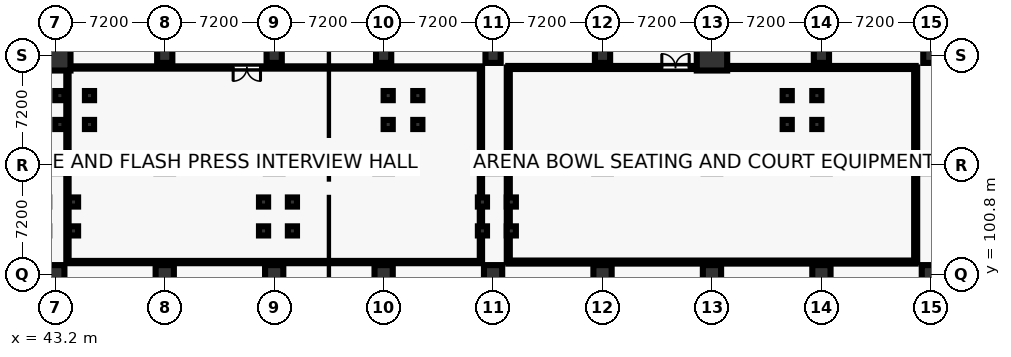
"""IFC4 building model, lengths in metres.
Left out: names, types, materials, properties, quantities, classifications, styles, units other than length and angle.
Written with IfcOpenShell. Run it as: python <this file> out.ifc"""

import sys

from ifc_helpers import new_model, si_unit, direction, frame, frame_2d, origin, origin_2d, place, context, subcontext, project, spatial, rectangle, circle, extrude, element, fill, save


model = new_model("IFC4")
c1 = context("Model", 3, precision=1e-05, world=origin(), true_north=direction((0.0, 1.0)))
c2 = subcontext(c1, "Body", "Model", "MODEL_VIEW")
j1 = project(units=[si_unit("LENGTHUNIT", "METRE"), si_unit("PLANEANGLEUNIT", "RADIAN")], contexts=[c1])
p1 = place(None, origin())
s1 = spatial("IfcSite", under=j1, at=p1, CompositionType="ELEMENT")
p2 = place(p1, origin())
s2 = spatial("IfcBuilding", under=s1, at=p2, CompositionType="ELEMENT")
p3 = place(p2, frame((0.0, 0.0, -5.4)))
s3 = spatial("IfcBuildingStorey", under=s2, at=p3, CompositionType="ELEMENT", Elevation=-5.4)
p4 = place(p3, frame((43.2, 100.8, 0.0), z_axis=(0.0, 0.0, 1.0), x_axis=(1.0, 0.0, 0.0)))
e1 = element("IfcColumn", 1, at=p4, inside=s3, PredefinedType="COLUMN", context=c2, shape_type="SweptSolid", body=[
    extrude(circle(Radius=0.6, at=origin_2d()), origin(), (0.0, 0.0, 1.0), 5.4),
])
p5 = place(p3, frame((43.2, 108.0, 0.0), z_axis=(0.0, 0.0, 1.0), x_axis=(1.0, 0.0, 0.0)))
e2 = element("IfcColumn", 2, at=p5, inside=s3, PredefinedType="COLUMN", context=c2, shape_type="SweptSolid", body=[
    extrude(rectangle(XDim=1.1, YDim=1.1, at=origin_2d()), origin(), (0.0, 0.0, 1.0), 5.4),
])
p6 = place(p3, frame((43.2, 115.2, 0.0), z_axis=(0.0, 0.0, 1.0), x_axis=(1.0, 0.0, 0.0)))
e3 = element("IfcColumn", 3, at=p6, inside=s3, PredefinedType="COLUMN", context=c2, shape_type="SweptSolid", body=[
    extrude(circle(Radius=1.0, at=origin_2d()), origin(), (0.0, 0.0, 1.0), 5.4),
])
p7 = place(p3, frame((50.4, 100.8, 0.0), z_axis=(0.0, 0.0, 1.0), x_axis=(1.0, 0.0, 0.0)))
e4 = element("IfcColumn", 4, at=p7, inside=s3, PredefinedType="COLUMN", context=c2, shape_type="SweptSolid", body=[
    extrude(circle(Radius=0.6, at=origin_2d()), origin(), (0.0, 0.0, 1.0), 5.4),
])
p8 = place(p3, frame((50.4, 108.0, 0.0), z_axis=(0.0, 0.0, 1.0), x_axis=(1.0, 0.0, 0.0)))
e5 = element("IfcColumn", 5, at=p8, inside=s3, PredefinedType="COLUMN", context=c2, shape_type="SweptSolid", body=[
    extrude(rectangle(XDim=1.1, YDim=1.1, at=origin_2d()), origin(), (0.0, 0.0, 1.0), 5.4),
])
p9 = place(p3, frame((50.4, 115.2, 0.0), z_axis=(0.0, 0.0, 1.0), x_axis=(1.0, 0.0, 0.0)))
e6 = element("IfcColumn", 6, at=p9, inside=s3, PredefinedType="COLUMN", context=c2, shape_type="SweptSolid", body=[
    extrude(rectangle(XDim=1.0, YDim=1.0, at=origin_2d()), origin(), (0.0, 0.0, 1.0), 5.4),
])
p10 = place(p3, frame((57.6, 100.8, 0.0), z_axis=(0.0, 0.0, 1.0), x_axis=(1.0, 0.0, 0.0)))
e7 = element("IfcColumn", 7, at=p10, inside=s3, PredefinedType="COLUMN", context=c2, shape_type="SweptSolid", body=[
    extrude(circle(Radius=0.6, at=origin_2d()), origin(), (0.0, 0.0, 1.0), 5.4),
])
p11 = place(p3, frame((57.6, 108.0, 0.0), z_axis=(0.0, 0.0, 1.0), x_axis=(1.0, 0.0, 0.0)))
e8 = element("IfcColumn", 8, at=p11, inside=s3, PredefinedType="COLUMN", context=c2, shape_type="SweptSolid", body=[
    extrude(rectangle(XDim=1.1, YDim=1.1, at=origin_2d()), origin(), (0.0, 0.0, 1.0), 5.4),
])
p12 = place(p3, frame((57.6, 115.2, 0.0), z_axis=(0.0, 0.0, 1.0), x_axis=(1.0, 0.0, 0.0)))
e9 = element("IfcColumn", 9, at=p12, inside=s3, PredefinedType="COLUMN", context=c2, shape_type="SweptSolid", body=[
    extrude(circle(Radius=0.5, at=origin_2d()), origin(), (0.0, 0.0, 1.0), 5.4),
])
p13 = place(p3, frame((64.8, 100.8, 0.0), z_axis=(0.0, 0.0, 1.0), x_axis=(1.0, 0.0, 0.0)))
e10 = element("IfcColumn", 10, at=p13, inside=s3, PredefinedType="COLUMN", context=c2, shape_type="SweptSolid", body=[
    extrude(circle(Radius=0.6, at=origin_2d()), origin(), (0.0, 0.0, 1.0), 5.4),
])
p14 = place(p3, frame((64.8, 108.0, 0.0), z_axis=(0.0, 0.0, 1.0), x_axis=(1.0, 0.0, 0.0)))
e11 = element("IfcColumn", 11, at=p14, inside=s3, PredefinedType="COLUMN", context=c2, shape_type="SweptSolid", body=[
    extrude(rectangle(XDim=1.1, YDim=1.1, at=origin_2d()), origin(), (0.0, 0.0, 1.0), 5.4),
])
p15 = place(p3, frame((64.8, 115.2, 0.0), z_axis=(0.0, 0.0, 1.0), x_axis=(1.0, 0.0, 0.0)))
e12 = element("IfcColumn", 12, at=p15, inside=s3, PredefinedType="COLUMN", context=c2, shape_type="SweptSolid", body=[
    extrude(rectangle(XDim=1.0, YDim=1.0, at=origin_2d()), origin(), (0.0, 0.0, 1.0), 5.4),
])
p16 = place(p3, frame((72.0, 100.8, 0.0), z_axis=(0.0, 0.0, 1.0), x_axis=(1.0, 0.0, 0.0)))
e13 = element("IfcColumn", 13, at=p16, inside=s3, PredefinedType="COLUMN", context=c2, shape_type="SweptSolid", body=[
    extrude(circle(Radius=0.6, at=origin_2d()), origin(), (0.0, 0.0, 1.0), 5.4),
])
p17 = place(p3, frame((72.0, 108.0, 0.0), z_axis=(0.0, 0.0, 1.0), x_axis=(1.0, 0.0, 0.0)))
e14 = element("IfcColumn", 14, at=p17, inside=s3, PredefinedType="COLUMN", context=c2, shape_type="SweptSolid", body=[
    extrude(rectangle(XDim=1.1, YDim=1.1, at=origin_2d()), origin(), (0.0, 0.0, 1.0), 5.4),
])
p18 = place(p3, frame((72.0, 115.2, 0.0), z_axis=(0.0, 0.0, 1.0), x_axis=(1.0, 0.0, 0.0)))
e15 = element("IfcColumn", 15, at=p18, inside=s3, PredefinedType="COLUMN", context=c2, shape_type="SweptSolid", body=[
    extrude(circle(Radius=0.5, at=origin_2d()), origin(), (0.0, 0.0, 1.0), 5.4),
])
p19 = place(p3, frame((79.2, 100.8, 0.0), z_axis=(0.0, 0.0, 1.0), x_axis=(1.0, 0.0, 0.0)))
e16 = element("IfcColumn", 16, at=p19, inside=s3, PredefinedType="COLUMN", context=c2, shape_type="SweptSolid", body=[
    extrude(circle(Radius=0.6, at=origin_2d()), origin(), (0.0, 0.0, 1.0), 5.4),
])
p20 = place(p3, frame((79.2, 108.0, 0.0), z_axis=(0.0, 0.0, 1.0), x_axis=(1.0, 0.0, 0.0)))
e17 = element("IfcColumn", 17, at=p20, inside=s3, PredefinedType="COLUMN", context=c2, shape_type="SweptSolid", body=[
    extrude(rectangle(XDim=1.1, YDim=1.1, at=origin_2d()), origin(), (0.0, 0.0, 1.0), 5.4),
])
p21 = place(p3, frame((79.2, 115.2, 0.0), z_axis=(0.0, 0.0, 1.0), x_axis=(1.0, 0.0, 0.0)))
e18 = element("IfcColumn", 18, at=p21, inside=s3, PredefinedType="COLUMN", context=c2, shape_type="SweptSolid", body=[
    extrude(rectangle(XDim=1.0, YDim=1.0, at=origin_2d()), origin(), (0.0, 0.0, 1.0), 5.4),
])
p22 = place(p3, frame((86.4, 100.8, 0.0), z_axis=(0.0, 0.0, 1.0), x_axis=(1.0, 0.0, 0.0)))
e19 = element("IfcColumn", 19, at=p22, inside=s3, PredefinedType="COLUMN", context=c2, shape_type="SweptSolid", body=[
    extrude(circle(Radius=0.6, at=origin_2d()), origin(), (0.0, 0.0, 1.0), 5.4),
])
p23 = place(p3, frame((86.4, 108.0, 0.0), z_axis=(0.0, 0.0, 1.0), x_axis=(1.0, 0.0, 0.0)))
e20 = element("IfcColumn", 20, at=p23, inside=s3, PredefinedType="COLUMN", context=c2, shape_type="SweptSolid", body=[
    extrude(rectangle(XDim=1.1, YDim=1.1, at=origin_2d()), origin(), (0.0, 0.0, 1.0), 5.4),
])
p24 = place(p3, frame((86.4, 115.2, 0.0), z_axis=(0.0, 0.0, 1.0), x_axis=(1.0, 0.0, 0.0)))
e21 = element("IfcColumn", 21, at=p24, inside=s3, PredefinedType="COLUMN", context=c2, shape_type="SweptSolid", body=[
    extrude(circle(Radius=1.0, at=origin_2d()), origin(), (0.0, 0.0, 1.0), 5.4),
])
p25 = place(p3, frame((93.6, 100.8, 0.0), z_axis=(0.0, 0.0, 1.0), x_axis=(1.0, 0.0, 0.0)))
e22 = element("IfcColumn", 22, at=p25, inside=s3, PredefinedType="COLUMN", context=c2, shape_type="SweptSolid", body=[
    extrude(circle(Radius=0.6, at=origin_2d()), origin(), (0.0, 0.0, 1.0), 5.4),
])
p26 = place(p3, frame((93.6, 108.0, 0.0), z_axis=(0.0, 0.0, 1.0), x_axis=(1.0, 0.0, 0.0)))
e23 = element("IfcColumn", 23, at=p26, inside=s3, PredefinedType="COLUMN", context=c2, shape_type="SweptSolid", body=[
    extrude(rectangle(XDim=1.1, YDim=1.1, at=origin_2d()), origin(), (0.0, 0.0, 1.0), 5.4),
])
p27 = place(p3, frame((93.6, 115.2, 0.0), z_axis=(0.0, 0.0, 1.0), x_axis=(1.0, 0.0, 0.0)))
e24 = element("IfcColumn", 24, at=p27, inside=s3, PredefinedType="COLUMN", context=c2, shape_type="SweptSolid", body=[
    extrude(rectangle(XDim=1.0, YDim=1.0, at=origin_2d()), origin(), (0.0, 0.0, 1.0), 5.4),
])
p28 = place(p3, frame((100.8, 100.8, 0.0), z_axis=(0.0, 0.0, 1.0), x_axis=(1.0, 0.0, 0.0)))
e25 = element("IfcColumn", 25, at=p28, inside=s3, PredefinedType="COLUMN", context=c2, shape_type="SweptSolid", body=[
    extrude(circle(Radius=0.6, at=origin_2d()), origin(), (0.0, 0.0, 1.0), 5.4),
])
p29 = place(p3, frame((100.8, 108.0, 0.0), z_axis=(0.0, 0.0, 1.0), x_axis=(1.0, 0.0, 0.0)))
e26 = element("IfcColumn", 26, at=p29, inside=s3, PredefinedType="COLUMN", context=c2, shape_type="SweptSolid", body=[
    extrude(rectangle(XDim=1.1, YDim=1.1, at=origin_2d()), origin(), (0.0, 0.0, 1.0), 5.4),
])
p30 = place(p3, frame((100.8, 115.2, 0.0), z_axis=(0.0, 0.0, 1.0), x_axis=(1.0, 0.0, 0.0)))
e27 = element("IfcColumn", 27, at=p30, inside=s3, PredefinedType="COLUMN", context=c2, shape_type="SweptSolid", body=[
    extrude(circle(Radius=0.5, at=origin_2d()), origin(), (0.0, 0.0, 1.0), 5.4),
])
for number, where, z_axis, x_axis in (
    (28, (44.4, 103.65, 0.0), (0.0, 0.0, 1.0), (1.0, 0.0, 0.0)),
    (29, (44.4, 105.55, 0.0), (0.0, 0.0, 1.0), (1.0, 0.0, 0.0)),
    (30, (56.9, 103.65, 0.0), (0.0, 0.0, 1.0), (1.0, 0.0, 0.0)),
    (31, (58.8, 103.65, 0.0), (0.0, 0.0, 1.0), (1.0, 0.0, 0.0)),
    (32, (56.9, 105.55, 0.0), (0.0, 0.0, 1.0), (1.0, 0.0, 0.0)),
    (33, (58.8, 105.55, 0.0), (0.0, 0.0, 1.0), (1.0, 0.0, 0.0)),
    (34, (71.3, 103.65, 0.0), (0.0, 0.0, 1.0), (1.0, 0.0, 0.0)),
    (35, (73.2, 103.65, 0.0), (0.0, 0.0, 1.0), (1.0, 0.0, 0.0)),
    (36, (71.3, 105.55, 0.0), (0.0, 0.0, 1.0), (1.0, 0.0, 0.0)),
    (37, (73.2, 105.55, 0.0), (0.0, 0.0, 1.0), (1.0, 0.0, 0.0)),
    (38, (43.5, 110.65, 0.0), (0.0, 0.0, 1.0), (1.0, 0.0, 0.0)),
    (39, (45.45, 110.65, 0.0), (0.0, 0.0, 1.0), (1.0, 0.0, 0.0)),
    (40, (43.5, 112.55, 0.0), (0.0, 0.0, 1.0), (1.0, 0.0, 0.0)),
    (41, (45.45, 112.55, 0.0), (0.0, 0.0, 1.0), (1.0, 0.0, 0.0)),
    (42, (65.1, 110.65, 0.0), (0.0, 0.0, 1.0), (1.0, 0.0, 0.0)),
    (43, (67.05, 110.65, 0.0), (0.0, 0.0, 1.0), (1.0, 0.0, 0.0)),
    (44, (65.1, 112.55, 0.0), (0.0, 0.0, 1.0), (1.0, 0.0, 0.0)),
    (45, (67.05, 112.55, 0.0), (0.0, 0.0, 1.0), (1.0, 0.0, 0.0)),
    (46, (91.35, 110.65, 0.0), (0.0, 0.0, 1.0), (1.0, 0.0, 0.0)),
    (47, (93.3, 110.65, 0.0), (0.0, 0.0, 1.0), (1.0, 0.0, 0.0)),
    (48, (91.35, 112.55, 0.0), (0.0, 0.0, 1.0), (1.0, 0.0, 0.0)),
    (49, (93.3, 112.55, 0.0), (0.0, 0.0, 1.0), (1.0, 0.0, 0.0)),
):
    element("IfcColumn", number, at=place(p3, frame(where, z_axis=z_axis, x_axis=x_axis)), inside=s3, PredefinedType="COLUMN", context=c2, shape_type="SweptSolid", body=[
        extrude(rectangle(XDim=0.6, YDim=0.6, at=origin_2d()), origin(), (0.0, 0.0, 1.0), 5.4),
    ])
p31 = place(p3, frame((44.0, 101.6, 0.0), z_axis=(0.0, 0.0, 1.0), x_axis=(1.0, 0.0, 0.0)))
e50 = element("IfcWall", 50, at=p31, inside=s3, PredefinedType="PARTITIONING", context=c2, shape_type="SweptSolid", body=[
    extrude(rectangle(XDim=27.2, YDim=0.15, at=frame_2d((13.6, 0.0))), origin(), (0.0, 0.0, 1.0), 4.04),
])
p32 = place(p3, frame((71.2, 101.6, 0.0), z_axis=(0.0, 0.0, 1.0), x_axis=(0.0, 1.0, 0.0)))
e51 = element("IfcWall", 51, at=p32, inside=s3, PredefinedType="PARTITIONING", context=c2, shape_type="SweptSolid", body=[
    extrude(rectangle(XDim=12.8, YDim=0.15, at=frame_2d((6.4, 0.0))), origin(), (0.0, 0.0, 1.0), 4.04),
])
p33 = place(p3, frame((71.2, 114.4, 0.0), z_axis=(0.0, 0.0, 1.0), x_axis=(-1.0, 0.0, 0.0)))
e52 = element("IfcWall", 52, at=p33, inside=s3, PredefinedType="PARTITIONING", context=c2, shape_type="SweptSolid", body=[
    extrude(rectangle(XDim=27.2, YDim=0.15, at=frame_2d((13.6, 0.0))), origin(), (0.0, 0.0, 1.0), 4.04),
])
p34 = place(p33, frame((14.5, 0.0, 0.0)))
e53 = element("IfcOpeningElement", 53, at=p34, cuts=e52, PredefinedType="OPENING", context=c2, shape_type="SweptSolid", body=[
    extrude(rectangle(XDim=1.8, YDim=2.3, at=frame_2d((0.9, 1.15))), frame((0.0, 0.085, 0.0), z_axis=(0.0, -1.0, 0.0), x_axis=(1.0, 0.0, 0.0)), (0.0, 0.0, 1.0), 0.17),
])
p35 = place(p3, frame((44.0, 114.4, 0.0), z_axis=(0.0, 0.0, 1.0), x_axis=(0.0, -1.0, 0.0)))
e54 = element("IfcWall", 54, at=p35, inside=s3, PredefinedType="PARTITIONING", context=c2, shape_type="SweptSolid", body=[
    extrude(rectangle(XDim=12.8, YDim=0.15, at=frame_2d((6.4, 0.0))), origin(), (0.0, 0.0, 1.0), 4.04),
])
p36 = place(p3, frame((73.0, 101.6, 0.0), z_axis=(0.0, 0.0, 1.0), x_axis=(1.0, 0.0, 0.0)))
e55 = element("IfcWall", 55, at=p36, inside=s3, PredefinedType="PARTITIONING", context=c2, shape_type="SweptSolid", body=[
    extrude(rectangle(XDim=26.8, YDim=0.2, at=frame_2d((13.4, 0.0))), origin(), (0.0, 0.0, 1.0), 4.04),
])
p37 = place(p3, frame((99.8, 101.6, 0.0), z_axis=(0.0, 0.0, 1.0), x_axis=(0.0, 1.0, 0.0)))
e56 = element("IfcWall", 56, at=p37, inside=s3, PredefinedType="PARTITIONING", context=c2, shape_type="SweptSolid", body=[
    extrude(rectangle(XDim=12.8, YDim=0.2, at=frame_2d((6.4, 0.0))), origin(), (0.0, 0.0, 1.0), 4.04),
])
p38 = place(p3, frame((99.8, 114.4, 0.0), z_axis=(0.0, 0.0, 1.0), x_axis=(-1.0, 0.0, 0.0)))
e57 = element("IfcWall", 57, at=p38, inside=s3, PredefinedType="PARTITIONING", context=c2, shape_type="SweptSolid", body=[
    extrude(rectangle(XDim=26.8, YDim=0.2, at=frame_2d((13.4, 0.0))), origin(), (0.0, 0.0, 1.0), 4.04),
])
p39 = place(p38, frame((14.9, 0.0, 0.0)))
e58 = element("IfcOpeningElement", 58, at=p39, cuts=e57, PredefinedType="OPENING", context=c2, shape_type="SweptSolid", body=[
    extrude(rectangle(XDim=1.8, YDim=2.3, at=frame_2d((0.9, 1.15))), frame((0.0, 0.11, 0.0), z_axis=(0.0, -1.0, 0.0), x_axis=(1.0, 0.0, 0.0)), (0.0, 0.0, 1.0), 0.22),
])
p40 = place(p3, frame((73.0, 114.4, 0.0), z_axis=(0.0, 0.0, 1.0), x_axis=(0.0, -1.0, 0.0)))
e59 = element("IfcWall", 59, at=p40, inside=s3, PredefinedType="PARTITIONING", context=c2, shape_type="SweptSolid", body=[
    extrude(rectangle(XDim=12.8, YDim=0.2, at=frame_2d((6.4, 0.0))), origin(), (0.0, 0.0, 1.0), 4.04),
])
p41 = place(p34, origin())
e60 = element("IfcDoor", 60, at=p41, inside=s3, OperationType="DOUBLE_DOOR_SINGLE_SWING", PredefinedType="DOOR", context=c2, shape_type="SweptSolid", body=[
    extrude(rectangle(XDim=1.8, YDim=2.3, at=frame_2d((0.9, 1.15))), frame((0.0, 0.025, 0.0), z_axis=(0.0, -1.0, 0.0), x_axis=(1.0, 0.0, 0.0)), (0.0, 0.0, 1.0), 0.05),
])
fill(e53, e60)
p42 = place(p39, frame((1.8, 0.0, 0.0), z_axis=(0.0, 0.0, 1.0), x_axis=(-1.0, 0.0, 0.0)))
e61 = element("IfcDoor", 61, at=p42, inside=s3, OperationType="DOUBLE_DOOR_SINGLE_SWING", PredefinedType="DOOR", context=c2, shape_type="SweptSolid", body=[
    extrude(rectangle(XDim=1.8, YDim=2.3, at=frame_2d((0.9, 1.15))), frame((0.0, 0.025, 0.0), z_axis=(0.0, -1.0, 0.0), x_axis=(1.0, 0.0, 0.0)), (0.0, 0.0, 1.0), 0.05),
])
fill(e58, e61)
save(model, sys.argv[1])
